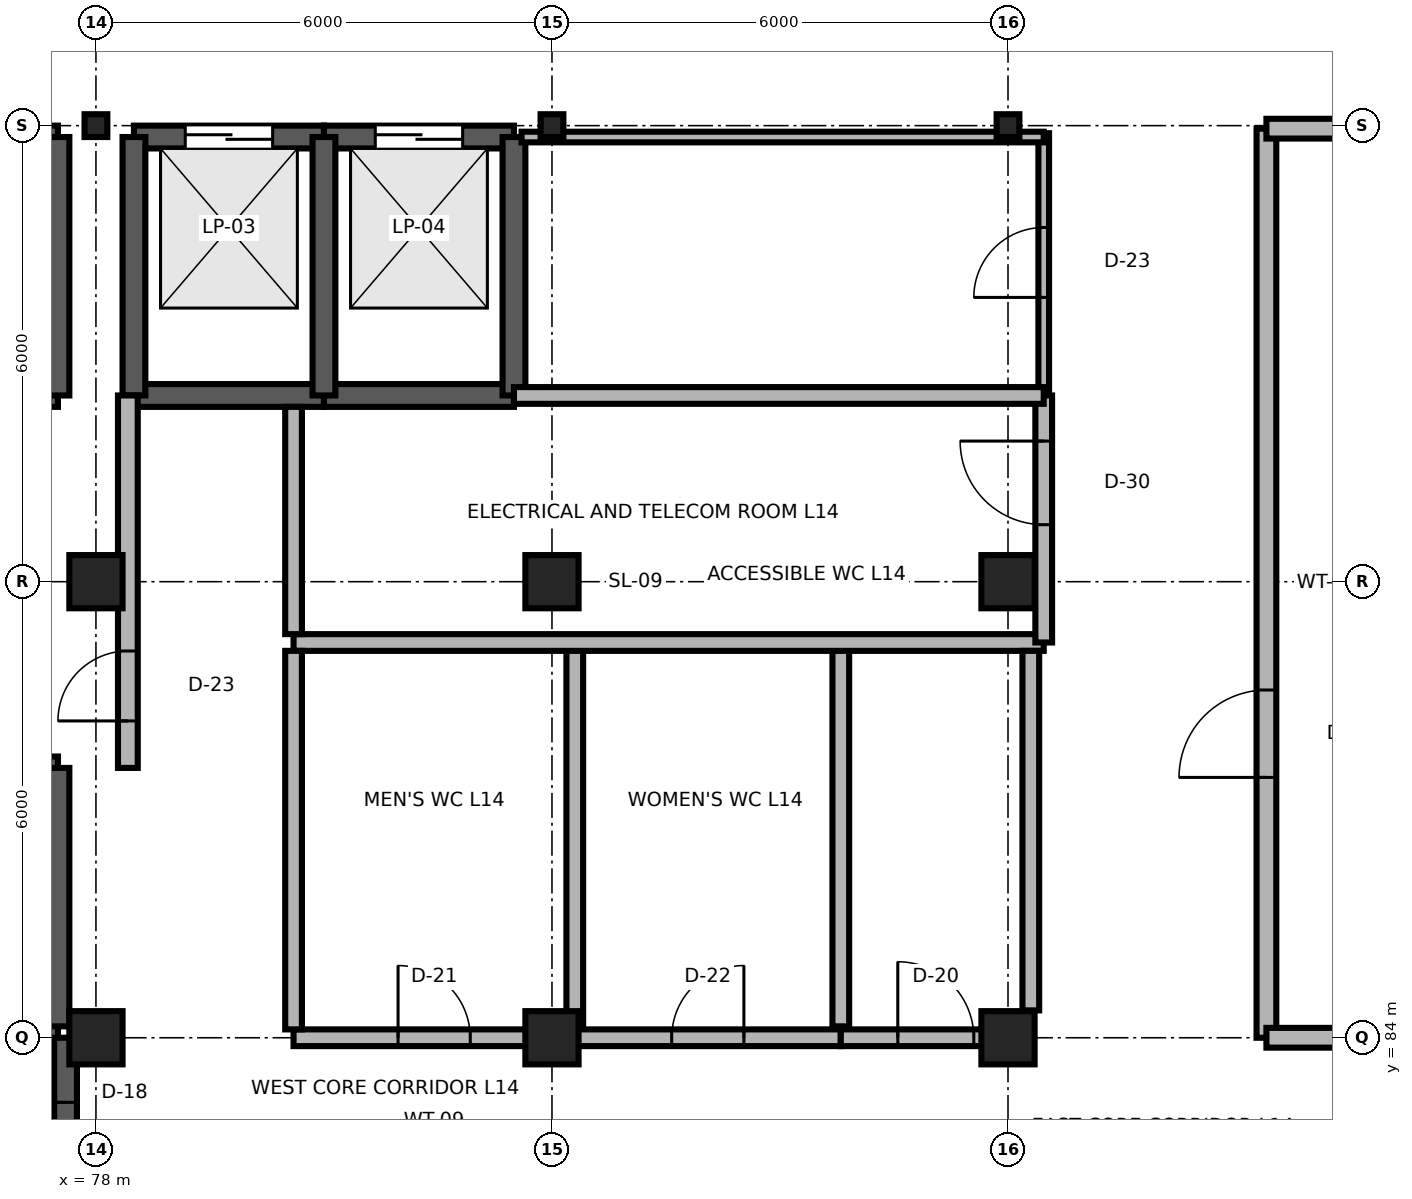
"""IFC4 building model, lengths in metres.
Left out: names, types, materials, properties, quantities, classifications, styles, units other than length and angle.
Written with IfcOpenShell. Run it as: python <this file> out.ifc"""

import sys

from ifc_helpers import new_model, si_unit, direction, frame, frame_2d, origin, origin_2d, place, context, subcontext, project, spatial, rectangle, i_section, extrude, element, fill, save


model = new_model("IFC4")
c1 = context("Model", 3, precision=1e-05, world=origin(), true_north=direction((0.0, 1.0)))
c2 = subcontext(c1, "Body", "Model", "MODEL_VIEW")
j1 = project(units=[si_unit("LENGTHUNIT", "METRE"), si_unit("PLANEANGLEUNIT", "RADIAN")], contexts=[c1])
p1 = place(None, origin())
s1 = spatial("IfcSite", under=j1, at=p1, CompositionType="ELEMENT")
p2 = place(p1, origin())
s2 = spatial("IfcBuilding", under=s1, at=p2, CompositionType="ELEMENT")
p3 = place(p2, frame((0.0, 0.0, 56.1)))
s3 = spatial("IfcBuildingStorey", under=s2, at=p3, CompositionType="ELEMENT", Elevation=56.1)
for number, where, z_axis, x_axis in (
    (1, (78.0, 84.0, 0.0), (0.0, 0.0, 1.0), (1.0, 0.0, 0.0)),
    (2, (84.0, 84.0, 0.0), (0.0, 0.0, 1.0), (1.0, 0.0, 0.0)),
    (3, (90.0, 84.0, 0.0), (0.0, 0.0, 1.0), (1.0, 0.0, 0.0)),
    (4, (78.0, 90.0, 0.0), (0.0, 0.0, 1.0), (1.0, 0.0, 0.0)),
    (5, (84.0, 90.0, 0.0), (0.0, 0.0, 1.0), (1.0, 0.0, 0.0)),
    (6, (90.0, 90.0, 0.0), (0.0, 0.0, 1.0), (1.0, 0.0, 0.0)),
):
    element("IfcColumn", number, at=place(p3, frame(where, z_axis=z_axis, x_axis=x_axis)), inside=s3, PredefinedType="COLUMN", context=c2, shape_type="SweptSolid", body=[
        extrude(rectangle(XDim=0.7, YDim=0.7, at=origin_2d()), origin(), (0.0, 0.0, 1.0), 3.9),
    ])
for number, where, z_axis, x_axis in (
    (7, (78.0, 96.0, 0.0), (0.0, 0.0, 1.0), (1.0, 0.0, 0.0)),
    (8, (84.0, 96.0, 0.0), (0.0, 0.0, 1.0), (1.0, 0.0, 0.0)),
    (9, (90.0, 96.0, 0.0), (0.0, 0.0, 1.0), (1.0, 0.0, 0.0)),
):
    element("IfcColumn", number, at=place(p3, frame(where, z_axis=z_axis, x_axis=x_axis)), inside=s3, PredefinedType="COLUMN", context=c2, shape_type="SweptSolid", body=[
        extrude(i_section(OverallWidth=0.3, OverallDepth=0.3, WebThickness=0.01, FlangeThickness=0.015, FilletRadius=0.018, at=origin_2d()), origin(), (0.0, 0.0, 1.0), 3.9),
    ])
p4 = place(p3, frame((75.0, 84.15, 0.0), z_axis=(0.0, 0.0, 1.0), x_axis=(1.0, 0.0, 0.0)))
e10 = element("IfcWall", 10, at=p4, inside=s3, PredefinedType="SHEAR", context=c2, shape_type="SweptSolid", body=[
    extrude(rectangle(XDim=2.5, YDim=0.3, at=frame_2d((1.25, 0.0))), origin(), (0.0, 0.0, 1.0), 3.74),
])
p5 = place(p4, frame((0.7, 0.0, 0.0)))
e11 = element("IfcOpeningElement", 11, at=p5, cuts=e10, PredefinedType="OPENING", context=c2, shape_type="SweptSolid", body=[
    extrude(rectangle(XDim=1.1, YDim=2.1, at=frame_2d((0.55, 1.05))), frame((0.0, 0.165, 0.0), z_axis=(0.0, -1.0, 0.0), x_axis=(1.0, 0.0, 0.0)), (0.0, 0.0, 1.0), 0.33),
])
p6 = place(p3, frame((75.0, 87.55, 0.0), z_axis=(0.0, 0.0, 1.0), x_axis=(1.0, 0.0, 0.0)))
e12 = element("IfcWall", 12, at=p6, inside=s3, PredefinedType="SHEAR", context=c2, shape_type="SweptSolid", body=[
    extrude(rectangle(XDim=2.5, YDim=0.3, at=frame_2d((1.25, 0.0))), origin(), (0.0, 0.0, 1.0), 3.74),
])
p7 = place(p3, frame((77.5, 84.15, 0.0), z_axis=(0.0, 0.0, 1.0), x_axis=(0.0, 1.0, 0.0)))
e13 = element("IfcWall", 13, at=p7, inside=s3, PredefinedType="SHEAR", context=c2, shape_type="SweptSolid", body=[
    extrude(rectangle(XDim=3.4, YDim=0.3, at=frame_2d((1.7, 0.0))), origin(), (0.0, 0.0, 1.0), 3.74),
])
p8 = place(p3, frame((75.0, 95.85, 0.0), z_axis=(0.0, 0.0, 1.0), x_axis=(1.0, 0.0, 0.0)))
e14 = element("IfcWall", 14, at=p8, inside=s3, PredefinedType="SHEAR", context=c2, shape_type="SweptSolid", body=[
    extrude(rectangle(XDim=2.5, YDim=0.3, at=frame_2d((1.25, 0.0))), origin(), (0.0, 0.0, 1.0), 3.74),
])
p9 = place(p8, frame((0.675, 0.0, 0.0)))
e15 = element("IfcOpeningElement", 15, at=p9, cuts=e14, PredefinedType="OPENING", context=c2, shape_type="SweptSolid", body=[
    extrude(rectangle(XDim=1.15, YDim=2.15, at=frame_2d((0.575, 1.075))), frame((0.0, 0.165, 0.0), z_axis=(0.0, -1.0, 0.0), x_axis=(1.0, 0.0, 0.0)), (0.0, 0.0, 1.0), 0.33),
])
p10 = place(p3, frame((75.0, 92.45, 0.0), z_axis=(0.0, 0.0, 1.0), x_axis=(1.0, 0.0, 0.0)))
e16 = element("IfcWall", 16, at=p10, inside=s3, PredefinedType="SHEAR", context=c2, shape_type="SweptSolid", body=[
    extrude(rectangle(XDim=2.5, YDim=0.3, at=frame_2d((1.25, 0.0))), origin(), (0.0, 0.0, 1.0), 3.74),
])
p11 = place(p3, frame((77.5, 92.45, 0.0), z_axis=(0.0, 0.0, 1.0), x_axis=(0.0, 1.0, 0.0)))
e17 = element("IfcWall", 17, at=p11, inside=s3, PredefinedType="SHEAR", context=c2, shape_type="SweptSolid", body=[
    extrude(rectangle(XDim=3.4, YDim=0.3, at=frame_2d((1.7, 0.0))), origin(), (0.0, 0.0, 1.0), 3.74),
])
p12 = place(p3, frame((78.5, 95.85, 0.0), z_axis=(0.0, 0.0, 1.0), x_axis=(1.0, 0.0, 0.0)))
e18 = element("IfcWall", 18, at=p12, inside=s3, PredefinedType="SHEAR", context=c2, shape_type="SweptSolid", body=[
    extrude(rectangle(XDim=2.5, YDim=0.3, at=frame_2d((1.25, 0.0))), origin(), (0.0, 0.0, 1.0), 3.74),
])
p13 = place(p12, frame((0.675, 0.0, 0.0)))
e19 = element("IfcOpeningElement", 19, at=p13, cuts=e18, PredefinedType="OPENING", context=c2, shape_type="SweptSolid", body=[
    extrude(rectangle(XDim=1.15, YDim=2.15, at=frame_2d((0.575, 1.075))), frame((0.0, 0.165, 0.0), z_axis=(0.0, -1.0, 0.0), x_axis=(1.0, 0.0, 0.0)), (0.0, 0.0, 1.0), 0.33),
])
p14 = place(p3, frame((78.5, 92.45, 0.0), z_axis=(0.0, 0.0, 1.0), x_axis=(1.0, 0.0, 0.0)))
e20 = element("IfcWall", 20, at=p14, inside=s3, PredefinedType="SHEAR", context=c2, shape_type="SweptSolid", body=[
    extrude(rectangle(XDim=2.5, YDim=0.3, at=frame_2d((1.25, 0.0))), origin(), (0.0, 0.0, 1.0), 3.74),
])
p15 = place(p3, frame((78.5, 92.45, 0.0), z_axis=(0.0, 0.0, 1.0), x_axis=(0.0, 1.0, 0.0)))
e21 = element("IfcWall", 21, at=p15, inside=s3, PredefinedType="SHEAR", context=c2, shape_type="SweptSolid", body=[
    extrude(rectangle(XDim=3.4, YDim=0.3, at=frame_2d((1.7, 0.0))), origin(), (0.0, 0.0, 1.0), 3.74),
])
p16 = place(p3, frame((81.0, 95.85, 0.0), z_axis=(0.0, 0.0, 1.0), x_axis=(1.0, 0.0, 0.0)))
e22 = element("IfcWall", 22, at=p16, inside=s3, PredefinedType="SHEAR", context=c2, shape_type="SweptSolid", body=[
    extrude(rectangle(XDim=2.5, YDim=0.3, at=frame_2d((1.25, 0.0))), origin(), (0.0, 0.0, 1.0), 3.74),
])
p17 = place(p16, frame((0.675, 0.0, 0.0)))
e23 = element("IfcOpeningElement", 23, at=p17, cuts=e22, PredefinedType="OPENING", context=c2, shape_type="SweptSolid", body=[
    extrude(rectangle(XDim=1.15, YDim=2.15, at=frame_2d((0.575, 1.075))), frame((0.0, 0.165, 0.0), z_axis=(0.0, -1.0, 0.0), x_axis=(1.0, 0.0, 0.0)), (0.0, 0.0, 1.0), 0.33),
])
p18 = place(p3, frame((81.0, 92.45, 0.0), z_axis=(0.0, 0.0, 1.0), x_axis=(1.0, 0.0, 0.0)))
e24 = element("IfcWall", 24, at=p18, inside=s3, PredefinedType="SHEAR", context=c2, shape_type="SweptSolid", body=[
    extrude(rectangle(XDim=2.5, YDim=0.3, at=frame_2d((1.25, 0.0))), origin(), (0.0, 0.0, 1.0), 3.74),
])
for number, where, z_axis, x_axis in (
    (25, (81.0, 92.45, 0.0), (0.0, 0.0, 1.0), (0.0, 1.0, 0.0)),
    (26, (83.5, 92.45, 0.0), (0.0, 0.0, 1.0), (0.0, 1.0, 0.0)),
):
    element("IfcWall", number, at=place(p3, frame(where, z_axis=z_axis, x_axis=x_axis)), inside=s3, PredefinedType="SHEAR", context=c2, shape_type="SweptSolid", body=[
        extrude(rectangle(XDim=3.4, YDim=0.3, at=frame_2d((1.7, 0.0))), origin(), (0.0, 0.0, 1.0), 3.74),
    ])
p19 = place(p3, frame((93.4, 84.0, 0.0), z_axis=(0.0, 0.0, 1.0), x_axis=(0.0, 1.0, 0.0)))
e27 = element("IfcWall", 27, at=p19, inside=s3, PredefinedType="PARTITIONING", context=c2, shape_type="SweptSolid", body=[
    extrude(rectangle(XDim=11.96, YDim=0.26, at=frame_2d((5.98, 0.0))), origin(), (0.0, 0.0, 1.0), 3.74),
])
p20 = place(p19, frame((3.425, 0.0, 0.0)))
e28 = element("IfcOpeningElement", 28, at=p20, cuts=e27, PredefinedType="OPENING", context=c2, shape_type="SweptSolid", body=[
    extrude(rectangle(XDim=1.15, YDim=2.2, at=frame_2d((0.575, 1.1))), frame((0.0, 0.145, 0.0), z_axis=(0.0, -1.0, 0.0), x_axis=(1.0, 0.0, 0.0)), (0.0, 0.0, 1.0), 0.29),
])
for number, where, z_axis, x_axis in (
    (29, (93.4, 84.0, 0.0), (0.0, 0.0, 1.0), (1.0, 0.0, 0.0)),
    (30, (93.4, 95.96, 0.0), (0.0, 0.0, 1.0), (1.0, 0.0, 0.0)),
):
    element("IfcWall", number, at=place(p3, frame(where, z_axis=z_axis, x_axis=x_axis)), inside=s3, PredefinedType="PARTITIONING", context=c2, shape_type="SweptSolid", body=[
        extrude(rectangle(XDim=2.25, YDim=0.26, at=frame_2d((1.125, 0.0))), origin(), (0.0, 0.0, 1.0), 3.449),
    ])
p21 = place(p3, frame((77.6, 81.0, 0.0), z_axis=(0.0, 0.0, 1.0), x_axis=(0.0, 1.0, 0.0)))
e31 = element("IfcWall", 31, at=p21, inside=s3, PredefinedType="SHEAR", context=c2, shape_type="SweptSolid", body=[
    extrude(rectangle(XDim=3.0, YDim=0.3, at=frame_2d((1.5, 0.0))), origin(), (0.0, 0.0, 1.0), 3.74),
])
p22 = place(p21, frame((0.85, 0.0, 0.0)))
e32 = element("IfcOpeningElement", 32, at=p22, cuts=e31, PredefinedType="OPENING", context=c2, shape_type="SweptSolid", body=[
    extrude(rectangle(XDim=1.3, YDim=2.2, at=frame_2d((0.65, 1.1))), frame((0.0, 0.165, 0.0), z_axis=(0.0, -1.0, 0.0), x_axis=(1.0, 0.0, 0.0)), (0.0, 0.0, 1.0), 0.33),
])
p23 = place(p3, frame((80.6, 84.0, 0.0), z_axis=(0.0, 0.0, 1.0), x_axis=(1.0, 0.0, 0.0)))
e33 = element("IfcWall", 33, at=p23, inside=s3, PredefinedType="PARTITIONING", context=c2, shape_type="SweptSolid", body=[
    extrude(rectangle(XDim=3.7, YDim=0.22, at=frame_2d((1.85, 0.0))), origin(), (0.0, 0.0, 1.0), 3.449),
])
p24 = place(p23, frame((1.375, 0.0, 0.0)))
e34 = element("IfcOpeningElement", 34, at=p24, cuts=e33, PredefinedType="OPENING", context=c2, shape_type="SweptSolid", body=[
    extrude(rectangle(XDim=0.95, YDim=2.15, at=frame_2d((0.475, 1.075))), frame((0.0, 0.125, 0.0), z_axis=(0.0, -1.0, 0.0), x_axis=(1.0, 0.0, 0.0)), (0.0, 0.0, 1.0), 0.25),
])
p25 = place(p3, frame((84.3, 84.0, 0.0), z_axis=(0.0, 0.0, 1.0), x_axis=(1.0, 0.0, 0.0)))
e35 = element("IfcWall", 35, at=p25, inside=s3, PredefinedType="PARTITIONING", context=c2, shape_type="SweptSolid", body=[
    extrude(rectangle(XDim=3.5, YDim=0.22, at=frame_2d((1.75, 0.0))), origin(), (0.0, 0.0, 1.0), 3.449),
])
p26 = place(p25, frame((1.275, 0.0, 0.0)))
e36 = element("IfcOpeningElement", 36, at=p26, cuts=e35, PredefinedType="OPENING", context=c2, shape_type="SweptSolid", body=[
    extrude(rectangle(XDim=0.95, YDim=2.1, at=frame_2d((0.475, 1.05))), frame((0.0, 0.125, 0.0), z_axis=(0.0, -1.0, 0.0), x_axis=(1.0, 0.0, 0.0)), (0.0, 0.0, 1.0), 0.25),
])
p27 = place(p3, frame((87.8, 84.0, 0.0), z_axis=(0.0, 0.0, 1.0), x_axis=(1.0, 0.0, 0.0)))
e37 = element("IfcWall", 37, at=p27, inside=s3, PredefinedType="PARTITIONING", context=c2, shape_type="SweptSolid", body=[
    extrude(rectangle(XDim=2.5, YDim=0.22, at=frame_2d((1.25, 0.0))), origin(), (0.0, 0.0, 1.0), 3.449),
])
p28 = place(p27, frame((0.75, 0.0, 0.0)))
e38 = element("IfcOpeningElement", 38, at=p28, cuts=e37, PredefinedType="OPENING", context=c2, shape_type="SweptSolid", body=[
    extrude(rectangle(XDim=1.0, YDim=2.15, at=frame_2d((0.5, 1.075))), frame((0.0, 0.125, 0.0), z_axis=(0.0, -1.0, 0.0), x_axis=(1.0, 0.0, 0.0)), (0.0, 0.0, 1.0), 0.25),
])
for number, where, z_axis, x_axis in (
    (39, (84.3, 84.15, 0.0), (0.0, 0.0, 1.0), (0.0, 1.0, 0.0)),
    (40, (87.8, 84.15, 0.0), (0.0, 0.0, 1.0), (0.0, 1.0, 0.0)),
):
    element("IfcWall", number, at=place(p3, frame(where, z_axis=z_axis, x_axis=x_axis)), inside=s3, PredefinedType="PARTITIONING", context=c2, shape_type="SweptSolid", body=[
        extrude(rectangle(XDim=5.0, YDim=0.22, at=frame_2d((2.5, 0.0))), origin(), (0.0, 0.0, 1.0), 3.74),
    ])
p29 = place(p3, frame((80.6, 89.2, 0.0), z_axis=(0.0, 0.0, 1.0), x_axis=(1.0, 0.0, 0.0)))
e41 = element("IfcWall", 41, at=p29, inside=s3, PredefinedType="PARTITIONING", context=c2, shape_type="SweptSolid", body=[
    extrude(rectangle(XDim=9.87, YDim=0.22, at=frame_2d((4.935, 0.0))), origin(), (0.0, 0.0, 1.0), 3.74),
])
p30 = place(p3, frame((90.47, 89.2, 0.0), z_axis=(0.0, 0.0, 1.0), x_axis=(0.0, 1.0, 0.0)))
e42 = element("IfcWall", 42, at=p30, inside=s3, PredefinedType="PARTITIONING", context=c2, shape_type="SweptSolid", body=[
    extrude(rectangle(XDim=3.25, YDim=0.22, at=frame_2d((1.625, 0.0))), origin(), (0.0, 0.0, 1.0), 3.74),
])
p31 = place(p30, frame((1.55, 0.0, 0.0)))
e43 = element("IfcOpeningElement", 43, at=p31, cuts=e42, PredefinedType="OPENING", context=c2, shape_type="SweptSolid", body=[
    extrude(rectangle(XDim=1.1, YDim=2.15, at=frame_2d((0.55, 1.075))), frame((0.0, 0.125, 0.0), z_axis=(0.0, -1.0, 0.0), x_axis=(1.0, 0.0, 0.0)), (0.0, 0.0, 1.0), 0.25),
])
p32 = place(p3, frame((78.42, 87.55, 0.0), z_axis=(0.0, 0.0, 1.0), x_axis=(0.0, 1.0, 0.0)))
e44 = element("IfcWall", 44, at=p32, inside=s3, PredefinedType="PARTITIONING", context=c2, shape_type="SweptSolid", body=[
    extrude(rectangle(XDim=4.9, YDim=0.26, at=frame_2d((2.45, 0.0))), origin(), (0.0, 0.0, 1.0), 3.74),
])
p33 = place(p32, frame((0.618, 0.0, 0.0)))
e45 = element("IfcOpeningElement", 45, at=p33, cuts=e44, PredefinedType="OPENING", context=c2, shape_type="SweptSolid", body=[
    extrude(rectangle(XDim=0.92, YDim=2.15, at=frame_2d((0.46, 1.075))), frame((0.0, 0.145, 0.0), z_axis=(0.0, -1.0, 0.0), x_axis=(1.0, 0.0, 0.0)), (0.0, 0.0, 1.0), 0.29),
])
p34 = place(p3, frame((90.47, 92.5, 0.0), z_axis=(0.0, 0.0, 1.0), x_axis=(0.0, 1.0, 0.0)))
e46 = element("IfcWall", 46, at=p34, inside=s3, PredefinedType="PARTITIONING", context=c2, shape_type="SweptSolid", body=[
    extrude(rectangle(XDim=3.4, YDim=0.14, at=frame_2d((1.7, 0.0))), origin(), (0.0, 0.0, 1.0), 3.74),
])
p35 = place(p34, frame((1.24, 0.0, 0.0)))
e47 = element("IfcOpeningElement", 47, at=p35, cuts=e46, PredefinedType="OPENING", context=c2, shape_type="SweptSolid", body=[
    extrude(rectangle(XDim=0.92, YDim=2.15, at=frame_2d((0.46, 1.075))), frame((0.0, 0.085, 0.0), z_axis=(0.0, -1.0, 0.0), x_axis=(1.0, 0.0, 0.0)), (0.0, 0.0, 1.0), 0.17),
])
p36 = place(p3, frame((83.6, 95.85, 0.0), z_axis=(0.0, 0.0, 1.0), x_axis=(1.0, 0.0, 0.0)))
e48 = element("IfcWall", 48, at=p36, inside=s3, PredefinedType="PARTITIONING", context=c2, shape_type="SweptSolid", body=[
    extrude(rectangle(XDim=6.87, YDim=0.14, at=frame_2d((3.435, 0.0))), origin(), (0.0, 0.0, 1.0), 3.74),
])
p37 = place(p3, frame((80.6, 84.11, 0.0), z_axis=(0.0, 0.0, 1.0), x_axis=(0.0, 1.0, 0.0)))
e49 = element("IfcWall", 49, at=p37, inside=s3, PredefinedType="PARTITIONING", context=c2, shape_type="SweptSolid", body=[
    extrude(rectangle(XDim=4.98, YDim=0.22, at=frame_2d((2.49, 0.0))), origin(), (0.0, 0.0, 1.0), 3.74),
])
p38 = place(p3, frame((90.3, 84.36, 0.0), z_axis=(0.0, 0.0, 1.0), x_axis=(0.0, 1.0, 0.0)))
e50 = element("IfcWall", 50, at=p38, inside=s3, PredefinedType="PARTITIONING", context=c2, shape_type="SweptSolid", body=[
    extrude(rectangle(XDim=4.73, YDim=0.22, at=frame_2d((2.365, 0.0))), origin(), (0.0, 0.0, 1.0), 3.74),
])
p39 = place(p3, frame((80.6, 89.31, 0.0), z_axis=(0.0, 0.0, 1.0), x_axis=(0.0, 1.0, 0.0)))
e51 = element("IfcWall", 51, at=p39, inside=s3, PredefinedType="PARTITIONING", context=c2, shape_type="SweptSolid", body=[
    extrude(rectangle(XDim=2.99, YDim=0.22, at=frame_2d((1.495, 0.0))), origin(), (0.0, 0.0, 1.0), 3.74),
])
p40 = place(p3, frame((83.5, 92.45, 0.0), z_axis=(0.0, 0.0, 1.0), x_axis=(1.0, 0.0, 0.0)))
e52 = element("IfcWall", 52, at=p40, inside=s3, PredefinedType="PARTITIONING", context=c2, shape_type="SweptSolid", body=[
    extrude(rectangle(XDim=6.97, YDim=0.22, at=frame_2d((3.485, 0.0))), origin(), (0.0, 0.0, 1.0), 3.74),
])
p41 = place(p13, origin())
e53 = element("IfcDoor", 53, at=p41, inside=s3, OperationType="DOUBLE_DOOR_SLIDING", PredefinedType="DOOR", context=c2, shape_type="SweptSolid", body=[
    extrude(rectangle(XDim=1.15, YDim=2.15, at=frame_2d((0.575, 1.075))), frame((0.0, 0.025, 0.0), z_axis=(0.0, -1.0, 0.0), x_axis=(1.0, 0.0, 0.0)), (0.0, 0.0, 1.0), 0.05),
])
fill(e19, e53)
p42 = place(p17, origin())
e54 = element("IfcDoor", 54, at=p42, inside=s3, OperationType="DOUBLE_DOOR_SLIDING", PredefinedType="DOOR", context=c2, shape_type="SweptSolid", body=[
    extrude(rectangle(XDim=1.15, YDim=2.15, at=frame_2d((0.575, 1.075))), frame((0.0, 0.025, 0.0), z_axis=(0.0, -1.0, 0.0), x_axis=(1.0, 0.0, 0.0)), (0.0, 0.0, 1.0), 0.05),
])
fill(e23, e54)
p43 = place(p20, origin())
e55 = element("IfcDoor", 55, at=p43, inside=s3, OperationType="SINGLE_SWING_LEFT", PredefinedType="DOOR", context=c2, shape_type="SweptSolid", body=[
    extrude(rectangle(XDim=1.15, YDim=2.2, at=frame_2d((0.575, 1.1))), frame((0.0, 0.025, 0.0), z_axis=(0.0, -1.0, 0.0), x_axis=(1.0, 0.0, 0.0)), (0.0, 0.0, 1.0), 0.05),
])
fill(e28, e55)
p44 = place(p22, origin())
e56 = element("IfcDoor", 56, at=p44, inside=s3, OperationType="SINGLE_SWING_RIGHT", PredefinedType="DOOR", context=c2, shape_type="SweptSolid", body=[
    extrude(rectangle(XDim=1.3, YDim=2.2, at=frame_2d((0.65, 1.1))), frame((0.0, 0.025, 0.0), z_axis=(0.0, -1.0, 0.0), x_axis=(1.0, 0.0, 0.0)), (0.0, 0.0, 1.0), 0.05),
])
fill(e32, e56)
p45 = place(p24, origin())
e57 = element("IfcDoor", 57, at=p45, inside=s3, OperationType="SINGLE_SWING_LEFT", PredefinedType="DOOR", context=c2, shape_type="SweptSolid", body=[
    extrude(rectangle(XDim=0.95, YDim=2.15, at=frame_2d((0.475, 1.075))), frame((0.0, 0.025, 0.0), z_axis=(0.0, -1.0, 0.0), x_axis=(1.0, 0.0, 0.0)), (0.0, 0.0, 1.0), 0.05),
])
fill(e34, e57)
p46 = place(p26, origin())
e58 = element("IfcDoor", 58, at=p46, inside=s3, OperationType="SINGLE_SWING_RIGHT", PredefinedType="DOOR", context=c2, shape_type="SweptSolid", body=[
    extrude(rectangle(XDim=0.95, YDim=2.1, at=frame_2d((0.475, 1.05))), frame((0.0, 0.025, 0.0), z_axis=(0.0, -1.0, 0.0), x_axis=(1.0, 0.0, 0.0)), (0.0, 0.0, 1.0), 0.05),
])
fill(e36, e58)
p47 = place(p28, origin())
e59 = element("IfcDoor", 59, at=p47, inside=s3, OperationType="SINGLE_SWING_LEFT", PredefinedType="DOOR", context=c2, shape_type="SweptSolid", body=[
    extrude(rectangle(XDim=1.0, YDim=2.15, at=frame_2d((0.5, 1.075))), frame((0.0, 0.025, 0.0), z_axis=(0.0, -1.0, 0.0), x_axis=(1.0, 0.0, 0.0)), (0.0, 0.0, 1.0), 0.05),
])
fill(e38, e59)
p48 = place(p31, origin())
e60 = element("IfcDoor", 60, at=p48, inside=s3, OperationType="SINGLE_SWING_RIGHT", PredefinedType="DOOR", context=c2, shape_type="SweptSolid", body=[
    extrude(rectangle(XDim=1.1, YDim=2.15, at=frame_2d((0.55, 1.075))), frame((0.0, 0.025, 0.0), z_axis=(0.0, -1.0, 0.0), x_axis=(1.0, 0.0, 0.0)), (0.0, 0.0, 1.0), 0.05),
])
fill(e43, e60)
p49 = place(p33, origin())
e61 = element("IfcDoor", 61, at=p49, inside=s3, OperationType="SINGLE_SWING_LEFT", PredefinedType="DOOR", context=c2, shape_type="SweptSolid", body=[
    extrude(rectangle(XDim=0.92, YDim=2.15, at=frame_2d((0.46, 1.075))), frame((0.0, 0.025, 0.0), z_axis=(0.0, -1.0, 0.0), x_axis=(1.0, 0.0, 0.0)), (0.0, 0.0, 1.0), 0.05),
])
fill(e45, e61)
p50 = place(p35, origin())
e62 = element("IfcDoor", 62, at=p50, inside=s3, OperationType="SINGLE_SWING_LEFT", PredefinedType="DOOR", context=c2, shape_type="SweptSolid", body=[
    extrude(rectangle(XDim=0.92, YDim=2.15, at=frame_2d((0.46, 1.075))), frame((0.0, 0.025, 0.0), z_axis=(0.0, -1.0, 0.0), x_axis=(1.0, 0.0, 0.0)), (0.0, 0.0, 1.0), 0.05),
])
fill(e47, e62)
save(model, sys.argv[1])
